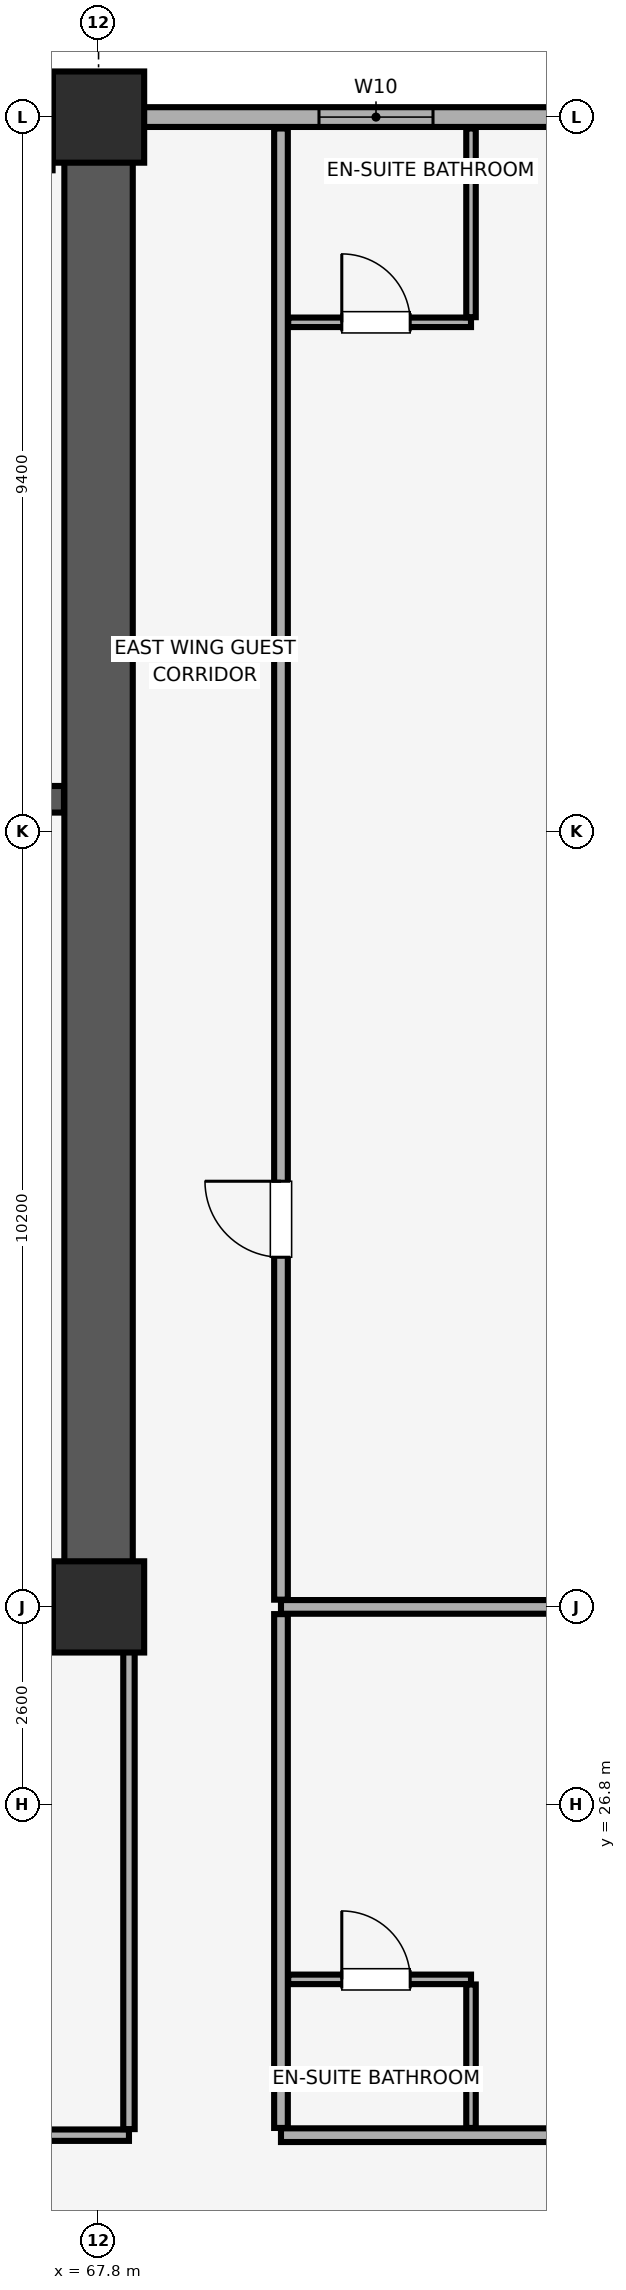
"""IFC4 building model, lengths in metres.
Left out: names, types, materials, properties, quantities, classifications, styles, units other than length and angle.
Written with IfcOpenShell. Run it as: python <this file> out.ifc"""

import sys

from ifc_helpers import new_model, si_unit, direction, frame, frame_2d, origin, origin_2d, place, context, subcontext, project, spatial, rectangle, extrude, element, fill, save


model = new_model("IFC4")
c1 = context("Model", 3, precision=1e-05, world=origin(), true_north=direction((0.0, 1.0)))
c2 = subcontext(c1, "Body", "Model", "MODEL_VIEW")
j1 = project(units=[si_unit("LENGTHUNIT", "METRE"), si_unit("PLANEANGLEUNIT", "RADIAN")], contexts=[c1])
p1 = place(None, origin())
s1 = spatial("IfcSite", under=j1, at=p1, CompositionType="ELEMENT")
p2 = place(p1, origin())
s2 = spatial("IfcBuilding", under=s1, at=p2, CompositionType="ELEMENT")
p3 = place(p2, frame((0.0, 0.0, 93.05)))
s3 = spatial("IfcBuildingStorey", under=s2, at=p3, CompositionType="ELEMENT", Elevation=93.05)
for number, where, z_axis, x_axis in (
    (1, (67.8, 29.4, 0.0), (0.0, 0.0, 1.0), (1.0, 0.0, 0.0)),
    (2, (67.8, 49.0, 0.0), (0.0, 0.0, 1.0), (1.0, 0.0, 0.0)),
):
    element("IfcColumn", number, at=place(p3, frame(where, z_axis=z_axis, x_axis=x_axis)), inside=s3, PredefinedType="COLUMN", context=c2, shape_type="SweptSolid", body=[
        extrude(rectangle(XDim=1.2, YDim=1.2, at=origin_2d()), origin(), (0.0, 0.0, 1.0), 3.51),
    ])
p4 = place(p3, frame((79.8, 49.0, 0.0), z_axis=(0.0, 0.0, 1.0), x_axis=(-1.0, 0.0, 0.0)))
e3 = element("IfcWall", 3, at=p4, inside=s3, PredefinedType="SOLIDWALL", context=c2, shape_type="SweptSolid", body=[
    extrude(rectangle(XDim=75.6, YDim=0.26, at=frame_2d((37.8, 0.0))), origin(), (0.0, 0.0, 1.0), 2.56),
])
p5 = place(p4, frame((72.565, 0.0, 0.85)))
e4 = element("IfcOpeningElement", 4, at=p5, cuts=e3, PredefinedType="OPENING", context=c2, shape_type="SweptSolid", body=[
    extrude(rectangle(XDim=1.5, YDim=1.4, at=frame_2d((0.75, 0.7))), frame((0.0, 0.14, 0.0), z_axis=(0.0, -1.0, 0.0), x_axis=(1.0, 0.0, 0.0)), (0.0, 0.0, 1.0), 0.28),
])
p6 = place(p4, frame((67.45, 0.0, 0.85)))
e5 = element("IfcOpeningElement", 5, at=p6, cuts=e3, PredefinedType="OPENING", context=c2, shape_type="SweptSolid", body=[
    extrude(rectangle(XDim=1.5, YDim=1.4, at=frame_2d((0.75, 0.7))), frame((0.0, 0.14, 0.0), z_axis=(0.0, -1.0, 0.0), x_axis=(1.0, 0.0, 0.0)), (0.0, 0.0, 1.0), 0.28),
])
p7 = place(p4, frame((7.6, 0.0, 0.85)))
e6 = element("IfcOpeningElement", 6, at=p7, cuts=e3, PredefinedType="OPENING", context=c2, shape_type="SweptSolid", body=[
    extrude(rectangle(XDim=1.5, YDim=1.4, at=frame_2d((0.75, 0.7))), frame((0.0, 0.14, 0.0), z_axis=(0.0, -1.0, 0.0), x_axis=(1.0, 0.0, 0.0)), (0.0, 0.0, 1.0), 0.28),
])
p8 = place(p4, frame((1.535, 0.0, 0.85)))
e7 = element("IfcOpeningElement", 7, at=p8, cuts=e3, PredefinedType="OPENING", context=c2, shape_type="SweptSolid", body=[
    extrude(rectangle(XDim=1.5, YDim=1.4, at=frame_2d((0.75, 0.7))), frame((0.0, 0.14, 0.0), z_axis=(0.0, -1.0, 0.0), x_axis=(1.0, 0.0, 0.0)), (0.0, 0.0, 1.0), 0.28),
])
p9 = place(p4, frame((52.265, 0.0, 0.9)))
e8 = element("IfcOpeningElement", 8, at=p9, cuts=e3, PredefinedType="OPENING", context=c2, shape_type="SweptSolid", body=[
    extrude(rectangle(XDim=1.5, YDim=1.4, at=frame_2d((0.75, 0.7))), frame((0.0, 0.14, 0.0), z_axis=(0.0, -1.0, 0.0), x_axis=(1.0, 0.0, 0.0)), (0.0, 0.0, 1.0), 0.28),
])
p10 = place(p4, frame((45.5, 0.0, 0.9)))
e9 = element("IfcOpeningElement", 9, at=p10, cuts=e3, PredefinedType="OPENING", context=c2, shape_type="SweptSolid", body=[
    extrude(rectangle(XDim=1.5, YDim=1.4, at=frame_2d((0.75, 0.7))), frame((0.0, 0.14, 0.0), z_axis=(0.0, -1.0, 0.0), x_axis=(1.0, 0.0, 0.0)), (0.0, 0.0, 1.0), 0.28),
])
p11 = place(p4, frame((31.05, 0.0, 0.9)))
e10 = element("IfcOpeningElement", 10, at=p11, cuts=e3, PredefinedType="OPENING", context=c2, shape_type="SweptSolid", body=[
    extrude(rectangle(XDim=1.5, YDim=1.4, at=frame_2d((0.75, 0.7))), frame((0.0, 0.14, 0.0), z_axis=(0.0, -1.0, 0.0), x_axis=(1.0, 0.0, 0.0)), (0.0, 0.0, 1.0), 0.28),
])
p12 = place(p4, frame((27.85, 0.0, 0.9)))
e11 = element("IfcOpeningElement", 11, at=p12, cuts=e3, PredefinedType="OPENING", context=c2, shape_type="SweptSolid", body=[
    extrude(rectangle(XDim=1.5, YDim=1.4, at=frame_2d((0.75, 0.7))), frame((0.0, 0.14, 0.0), z_axis=(0.0, -1.0, 0.0), x_axis=(1.0, 0.0, 0.0)), (0.0, 0.0, 1.0), 0.28),
])
p13 = place(p4, frame((23.485, 0.0, 0.9)))
e12 = element("IfcOpeningElement", 12, at=p13, cuts=e3, PredefinedType="OPENING", context=c2, shape_type="SweptSolid", body=[
    extrude(rectangle(XDim=1.5, YDim=1.4, at=frame_2d((0.75, 0.7))), frame((0.0, 0.14, 0.0), z_axis=(0.0, -1.0, 0.0), x_axis=(1.0, 0.0, 0.0)), (0.0, 0.0, 1.0), 0.28),
])
p14 = place(p3, frame((67.8, 29.4, 0.0), z_axis=(0.0, 0.0, 1.0), x_axis=(0.0, 1.0, 0.0)))
e13 = element("IfcWall", 13, at=p14, inside=s3, PredefinedType="SHEAR", context=c2, shape_type="SweptSolid", body=[
    extrude(rectangle(XDim=19.2, YDim=0.9, at=frame_2d((9.6, 0.0))), origin(), (0.0, 0.0, 1.0), 3.51),
])
p15 = place(p3, frame((60.4, 29.4, 0.0), z_axis=(0.0, 0.0, 1.0), x_axis=(1.0, 0.0, 0.0)))
e14 = element("IfcWall", 14, at=p15, inside=s3, PredefinedType="SHEAR", context=c2, shape_type="SweptSolid", body=[
    extrude(rectangle(XDim=6.945, YDim=0.9, at=frame_2d((3.473, 0.0))), origin(), (0.0, 0.0, 1.0), 3.51),
])
p16 = place(p3, frame((63.145, 40.025, 0.0), z_axis=(0.0, 0.0, 1.0), x_axis=(1.0, 0.0, 0.0)))
e15 = element("IfcWall", 15, at=p16, inside=s3, PredefinedType="SHEAR", context=c2, shape_type="SweptSolid", body=[
    extrude(rectangle(XDim=4.2, YDim=0.35, at=frame_2d((2.1, 0.0))), origin(), (0.0, 0.0, 1.0), 3.51),
])
p17 = place(p16, frame((1.24, 0.0, 0.0)))
e16 = element("IfcOpeningElement", 16, at=p17, cuts=e15, PredefinedType="OPENING", context=c2, shape_type="SweptSolid", body=[
    extrude(rectangle(XDim=1.15, YDim=2.15, at=frame_2d((0.575, 1.075))), frame((0.0, 0.185, 0.0), z_axis=(0.0, -1.0, 0.0), x_axis=(1.0, 0.0, 0.0)), (0.0, 0.0, 1.0), 0.37),
])
p18 = place(p3, frame((59.0, 22.45, 0.0), z_axis=(0.0, 0.0, 1.0), x_axis=(1.0, 0.0, 0.0)))
e17 = element("IfcWall", 17, at=p18, inside=s3, PredefinedType="PARTITIONING", context=c2, shape_type="SweptSolid", body=[
    extrude(rectangle(XDim=9.2, YDim=0.15, at=frame_2d((4.6, 0.0))), origin(), (0.0, 0.0, 1.0), 3.51),
])
p19 = place(p18, frame((4.1, 0.0, 0.0)))
e18 = element("IfcOpeningElement", 18, at=p19, cuts=e17, PredefinedType="OPENING", context=c2, shape_type="SweptSolid", body=[
    extrude(rectangle(XDim=1.0, YDim=2.15, at=frame_2d((0.5, 1.075))), frame((0.0, 0.085, 0.0), z_axis=(0.0, -1.0, 0.0), x_axis=(1.0, 0.0, 0.0)), (0.0, 0.0, 1.0), 0.17),
])
p20 = place(p3, frame((68.2, 22.53, 0.0), z_axis=(0.0, 0.0, 1.0), x_axis=(0.0, 1.0, 0.0)))
e19 = element("IfcWall", 19, at=p20, inside=s3, PredefinedType="PARTITIONING", context=c2, shape_type="SweptSolid", body=[
    extrude(rectangle(XDim=6.86, YDim=0.15, at=frame_2d((3.43, 0.0))), origin(), (0.0, 0.0, 1.0), 3.51),
])
p21 = place(p3, frame((70.2, 22.45, 0.0), z_axis=(0.0, 0.0, 1.0), x_axis=(1.0, 0.0, 0.0)))
e20 = element("IfcWall", 20, at=p21, inside=s3, PredefinedType="PARTITIONING", context=c2, shape_type="SweptSolid", body=[
    extrude(rectangle(XDim=13.65, YDim=0.18, at=frame_2d((6.825, 0.0))), origin(), (0.0, 0.0, 1.0), 3.51),
])
p22 = place(p21, frame((6.965, 0.0, 0.0)))
e21 = element("IfcOpeningElement", 21, at=p22, cuts=e20, PredefinedType="OPENING", context=c2, shape_type="SweptSolid", body=[
    extrude(rectangle(XDim=1.0, YDim=2.15, at=frame_2d((0.5, 1.075))), frame((0.0, 0.1, 0.0), z_axis=(0.0, -1.0, 0.0), x_axis=(1.0, 0.0, 0.0)), (0.0, 0.0, 1.0), 0.2),
])
p23 = place(p3, frame((70.2, 29.4, 0.0), z_axis=(0.0, 0.0, 1.0), x_axis=(1.0, 0.0, 0.0)))
e22 = element("IfcWall", 22, at=p23, inside=s3, PredefinedType="PARTITIONING", context=c2, shape_type="SweptSolid", body=[
    extrude(rectangle(XDim=13.65, YDim=0.18, at=frame_2d((6.825, 0.0))), origin(), (0.0, 0.0, 1.0), 2.86),
])
p24 = place(p3, frame((70.2, 22.545, 0.0), z_axis=(0.0, 0.0, 1.0), x_axis=(0.0, 1.0, 0.0)))
e23 = element("IfcWall", 23, at=p24, inside=s3, PredefinedType="PARTITIONING", context=c2, shape_type="SweptSolid", body=[
    extrude(rectangle(XDim=6.76, YDim=0.18, at=frame_2d((3.38, 0.0))), origin(), (0.0, 0.0, 1.0), 3.51),
])
p25 = place(p3, frame((70.295, 24.5, 0.0), z_axis=(0.0, 0.0, 1.0), x_axis=(1.0, 0.0, 0.0)))
e24 = element("IfcWall", 24, at=p25, inside=s3, PredefinedType="PARTITIONING", context=c2, shape_type="SweptSolid", body=[
    extrude(rectangle(XDim=2.405, YDim=0.125, at=frame_2d((1.203, 0.0))), origin(), (0.0, 0.0, 1.0), 3.51),
])
p26 = place(p25, frame((0.705, 0.0, 0.0)))
e25 = element("IfcOpeningElement", 25, at=p26, cuts=e24, PredefinedType="OPENING", context=c2, shape_type="SweptSolid", body=[
    extrude(rectangle(XDim=0.9, YDim=2.1, at=frame_2d((0.45, 1.05))), frame((0.0, 0.073, 0.0), z_axis=(0.0, -1.0, 0.0), x_axis=(1.0, 0.0, 0.0)), (0.0, 0.0, 1.0), 0.145),
])
p27 = place(p3, frame((72.7, 22.545, 0.0), z_axis=(0.0, 0.0, 1.0), x_axis=(0.0, 1.0, 0.0)))
e26 = element("IfcWall", 26, at=p27, inside=s3, PredefinedType="PARTITIONING", context=c2, shape_type="SweptSolid", body=[
    extrude(rectangle(XDim=1.888, YDim=0.125, at=frame_2d((0.944, 0.0))), origin(), (0.0, 0.0, 1.0), 3.51),
])
p28 = place(p3, frame((70.2, 29.495, 0.0), z_axis=(0.0, 0.0, 1.0), x_axis=(0.0, 1.0, 0.0)))
e27 = element("IfcWall", 27, at=p28, inside=s3, PredefinedType="PARTITIONING", context=c2, shape_type="SweptSolid", body=[
    extrude(rectangle(XDim=19.355, YDim=0.18, at=frame_2d((9.677, 0.0))), origin(), (0.0, 0.0, 1.0), 3.51),
])
p29 = place(p28, frame((4.505, 0.0, 0.0)))
e28 = element("IfcOpeningElement", 28, at=p29, cuts=e27, PredefinedType="OPENING", context=c2, shape_type="SweptSolid", body=[
    extrude(rectangle(XDim=1.0, YDim=2.15, at=frame_2d((0.5, 1.075))), frame((0.0, 0.1, 0.0), z_axis=(0.0, -1.0, 0.0), x_axis=(1.0, 0.0, 0.0)), (0.0, 0.0, 1.0), 0.2),
])
p30 = place(p3, frame((70.295, 46.3, 0.0), z_axis=(0.0, 0.0, 1.0), x_axis=(1.0, 0.0, 0.0)))
e29 = element("IfcWall", 29, at=p30, inside=s3, PredefinedType="PARTITIONING", context=c2, shape_type="SweptSolid", body=[
    extrude(rectangle(XDim=2.405, YDim=0.125, at=frame_2d((1.203, 0.0))), origin(), (0.0, 0.0, 1.0), 3.51),
])
p31 = place(p30, frame((0.705, 0.0, 0.0)))
e30 = element("IfcOpeningElement", 30, at=p31, cuts=e29, PredefinedType="OPENING", context=c2, shape_type="SweptSolid", body=[
    extrude(rectangle(XDim=0.9, YDim=2.1, at=frame_2d((0.45, 1.05))), frame((0.0, 0.073, 0.0), z_axis=(0.0, -1.0, 0.0), x_axis=(1.0, 0.0, 0.0)), (0.0, 0.0, 1.0), 0.145),
])
p32 = place(p3, frame((72.7, 46.367, 0.0), z_axis=(0.0, 0.0, 1.0), x_axis=(0.0, 1.0, 0.0)))
e31 = element("IfcWall", 31, at=p32, inside=s3, PredefinedType="PARTITIONING", context=c2, shape_type="SweptSolid", body=[
    extrude(rectangle(XDim=2.483, YDim=0.125, at=frame_2d((1.241, 0.0))), origin(), (0.0, 0.0, 1.0), 3.51),
])
p33 = place(p7, origin())
e32 = element("IfcWindow", 32, at=p33, inside=s3, PartitioningType="SINGLE_PANEL", PredefinedType="WINDOW", context=c2, shape_type="SweptSolid", body=[
    extrude(rectangle(XDim=1.5, YDim=1.4, at=frame_2d((0.75, 0.7))), frame((0.0, 0.03, 0.0), z_axis=(0.0, -1.0, 0.0), x_axis=(1.0, 0.0, 0.0)), (0.0, 0.0, 1.0), 0.06),
])
fill(e6, e32)
p34 = place(p26, origin())
e33 = element("IfcDoor", 33, at=p34, inside=s3, OperationType="SINGLE_SWING_LEFT", PredefinedType="DOOR", context=c2, shape_type="SweptSolid", body=[
    extrude(rectangle(XDim=0.9, YDim=2.1, at=frame_2d((0.45, 1.05))), frame((0.0, 0.025, 0.0), z_axis=(0.0, -1.0, 0.0), x_axis=(1.0, 0.0, 0.0)), (0.0, 0.0, 1.0), 0.05),
])
fill(e25, e33)
p35 = place(p29, origin())
e34 = element("IfcDoor", 34, at=p35, inside=s3, OperationType="SINGLE_SWING_RIGHT", PredefinedType="DOOR", context=c2, shape_type="SweptSolid", body=[
    extrude(rectangle(XDim=1.0, YDim=2.15, at=frame_2d((0.5, 1.075))), frame((0.0, 0.025, 0.0), z_axis=(0.0, -1.0, 0.0), x_axis=(1.0, 0.0, 0.0)), (0.0, 0.0, 1.0), 0.05),
])
fill(e28, e34)
p36 = place(p31, origin())
e35 = element("IfcDoor", 35, at=p36, inside=s3, OperationType="SINGLE_SWING_LEFT", PredefinedType="DOOR", context=c2, shape_type="SweptSolid", body=[
    extrude(rectangle(XDim=0.9, YDim=2.1, at=frame_2d((0.45, 1.05))), frame((0.0, 0.025, 0.0), z_axis=(0.0, -1.0, 0.0), x_axis=(1.0, 0.0, 0.0)), (0.0, 0.0, 1.0), 0.05),
])
fill(e30, e35)
save(model, sys.argv[1])
